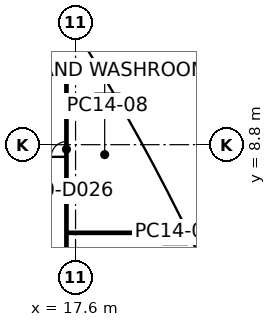
"""IFC4 building model, lengths in metres.
Left out: names, types, materials, properties, quantities, classifications, styles, units other than length and angle.
Written with IfcOpenShell. Run it as: python <this file> out.ifc"""

import sys

from ifc_helpers import new_model, si_unit, direction, frame, frame_2d, origin, origin_2d, place, context, subcontext, project, spatial, rectangle, extrude, element, fill, save


model = new_model("IFC4")
c1 = context("Model", 3, precision=1e-05, world=origin(), true_north=direction((0.0, 1.0)))
c2 = subcontext(c1, "Body", "Model", "MODEL_VIEW")
j1 = project(units=[si_unit("LENGTHUNIT", "METRE"), si_unit("PLANEANGLEUNIT", "RADIAN")], contexts=[c1])
p1 = place(None, origin())
s1 = spatial("IfcSite", under=j1, at=p1, CompositionType="ELEMENT")
p2 = place(p1, origin())
s2 = spatial("IfcBuilding", under=s1, at=p2, CompositionType="ELEMENT")
p3 = place(p2, origin())
s3 = spatial("IfcBuildingStorey", under=s2, at=p3, CompositionType="ELEMENT", Elevation=0.0)
for number, where, z_axis, x_axis in (
    (1, (24.158, 3.035, 0.0), (0.0, 0.0, 1.0), (-0.442, 0.897, 0.0)),
    (2, (19.702, 11.375, 0.0), (0.0, 0.0, 1.0), (-0.5, 0.866, 0.0)),
):
    element("IfcColumn", number, at=place(p3, frame(where, z_axis=z_axis, x_axis=x_axis)), inside=s3, PredefinedType="COLUMN", context=c2, shape_type="SweptSolid", body=[
        extrude(rectangle(XDim=1.4, YDim=1.4, at=origin_2d()), origin(), (0.0, 0.0, 1.0), 9.0),
    ])
p4 = place(p3, frame((17.0, 3.0, 0.0), z_axis=(0.0, 0.0, 1.0), x_axis=(1.0, 0.0, 0.0)))
e3 = element("IfcWall", 3, at=p4, inside=s3, PredefinedType="PARTITIONING", context=c2, shape_type="SweptSolid", body=[
    extrude(rectangle(XDim=7.874, YDim=0.15, at=frame_2d((3.937, 0.0))), origin(), (0.0, 0.0, 1.0), 7.94),
])
p5 = place(p3, frame((18.883, 14.0, 0.0), z_axis=(0.0, 0.0, 1.0), x_axis=(-1.0, 0.0, 0.0)))
e4 = element("IfcWall", 4, at=p5, inside=s3, PredefinedType="PARTITIONING", context=c2, shape_type="SweptSolid", body=[
    extrude(rectangle(XDim=1.883, YDim=0.15, at=frame_2d((0.942, 0.0))), origin(), (0.0, 0.0, 1.0), 7.94),
])
p6 = place(p3, frame((16.92, 14.0, 0.0), z_axis=(0.0, 0.0, 1.0), x_axis=(-1.0, 0.0, 0.0)))
e5 = element("IfcWall", 5, at=p6, inside=s3, PredefinedType="PARTITIONING", context=c2, shape_type="SweptSolid", body=[
    extrude(rectangle(XDim=13.919, YDim=0.15, at=frame_2d((6.959, 0.0))), origin(), (0.0, 0.0, 1.0), 7.94),
])
p7 = place(p6, frame((6.409, 0.0, 0.0)))
e6 = element("IfcOpeningElement", 6, at=p7, cuts=e5, PredefinedType="OPENING", context=c2, shape_type="SweptSolid", body=[
    extrude(rectangle(XDim=1.0, YDim=2.1, at=frame_2d((0.5, 1.05))), frame((0.0, 0.075, 0.0), z_axis=(0.0, -1.0, 0.0), x_axis=(1.0, 0.0, 0.0)), (0.0, 0.0, 1.0), 0.15),
])
p8 = place(p3, frame((17.0, -13.92, 0.0), z_axis=(0.0, 0.0, 1.0), x_axis=(0.0, 1.0, 0.0)))
e7 = element("IfcWall", 7, at=p8, inside=s3, PredefinedType="PARTITIONING", context=c2, shape_type="SweptSolid", body=[
    extrude(rectangle(XDim=27.84, YDim=0.15, at=frame_2d((13.92, 0.0))), origin(), (0.0, 0.0, 1.0), 7.847),
])
p9 = place(p8, frame((21.92, 0.0, 0.0)))
e8 = element("IfcOpeningElement", 8, at=p9, cuts=e7, PredefinedType="OPENING", context=c2, shape_type="SweptSolid", body=[
    extrude(rectangle(XDim=1.0, YDim=2.1, at=frame_2d((0.5, 1.05))), frame((0.0, 0.075, 0.0), z_axis=(0.0, -1.0, 0.0), x_axis=(1.0, 0.0, 0.0)), (0.0, 0.0, 1.0), 0.15),
])
p10 = place(p8, frame((7.92, 0.0, 0.0)))
e9 = element("IfcOpeningElement", 9, at=p10, cuts=e7, PredefinedType="OPENING", context=c2, shape_type="SweptSolid", body=[
    extrude(rectangle(XDim=1.0, YDim=2.1, at=frame_2d((0.5, 1.05))), frame((0.0, 0.075, 0.0), z_axis=(0.0, -1.0, 0.0), x_axis=(1.0, 0.0, 0.0)), (0.0, 0.0, 1.0), 0.15),
])
p11 = place(p9, origin())
e10 = element("IfcDoor", 10, at=p11, inside=s3, OperationType="SINGLE_SWING_RIGHT", PredefinedType="DOOR", context=c2, shape_type="SweptSolid", body=[
    extrude(rectangle(XDim=1.0, YDim=2.1, at=frame_2d((0.5, 1.05))), frame((0.0, 0.025, 0.0), z_axis=(0.0, -1.0, 0.0), x_axis=(1.0, 0.0, 0.0)), (0.0, 0.0, 1.0), 0.05),
])
fill(e8, e10)
save(model, sys.argv[1])
